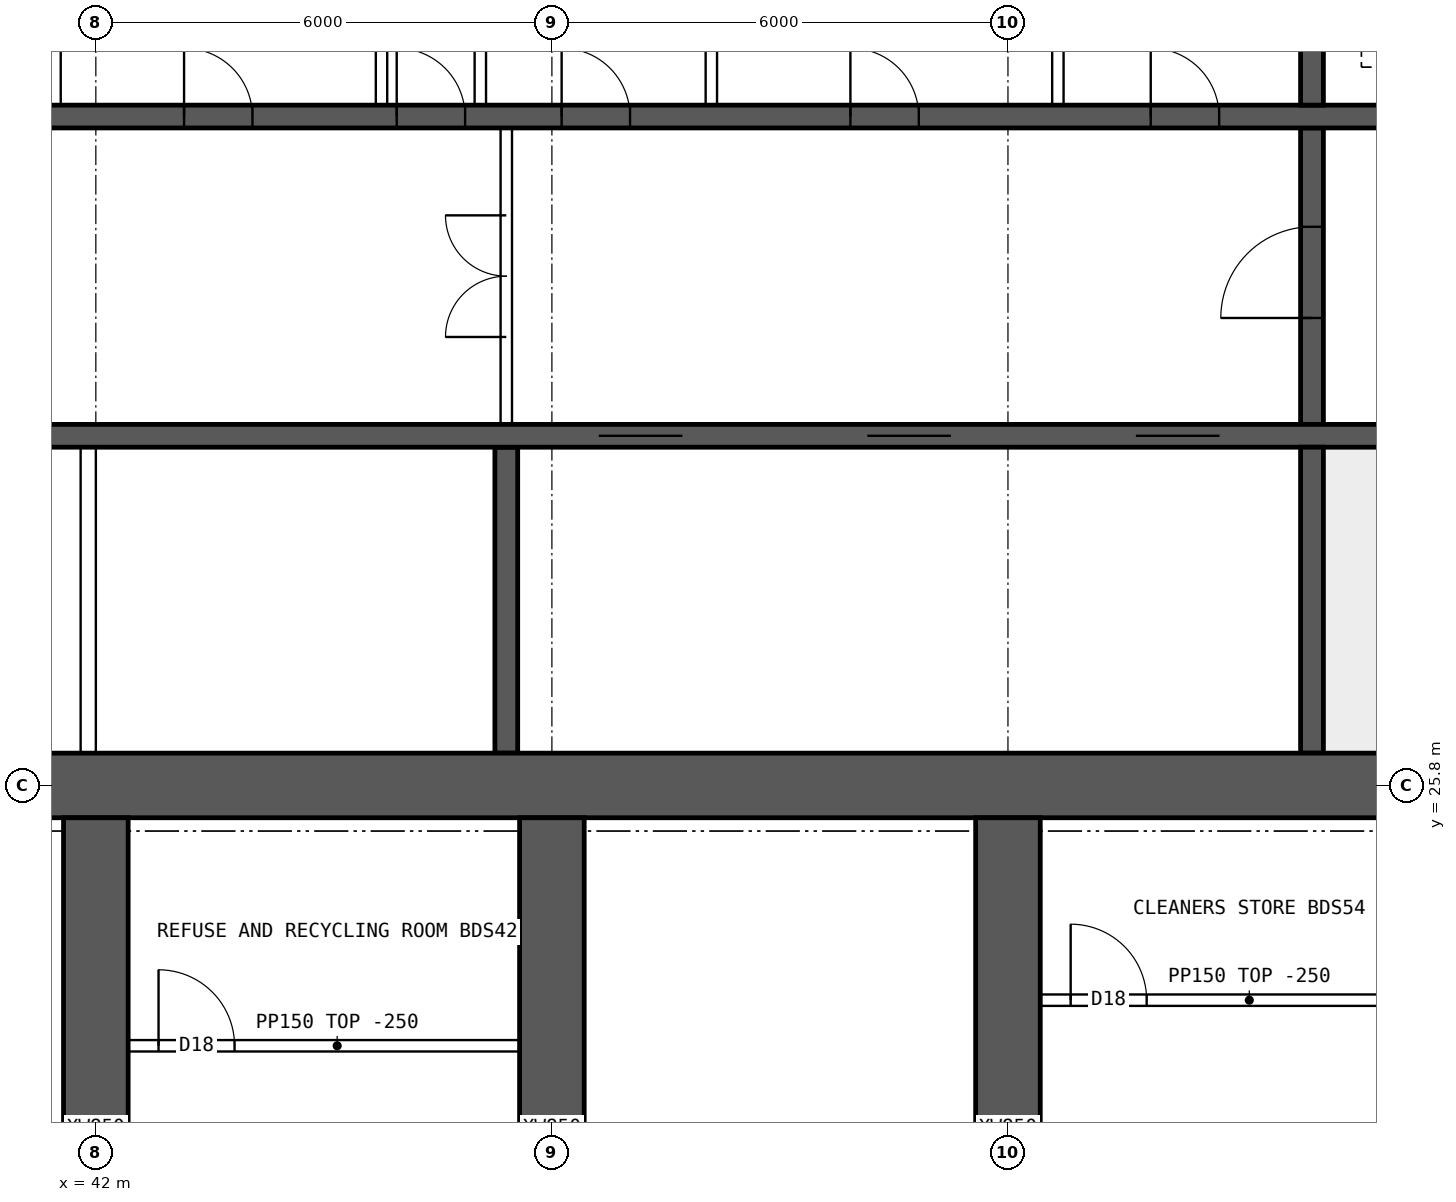
"""IFC4 building model, lengths in metres.
Left out: names, types, materials, properties, quantities, classifications, styles, units other than length and angle.
Written with IfcOpenShell. Run it as: python <this file> out.ifc"""

import sys

from ifc_helpers import new_model, si_unit, direction, frame, frame_2d, origin, place, context, subcontext, project, spatial, rectangle, extrude, element, fill, save


model = new_model("IFC4")
c1 = context("Model", 3, precision=1e-05, world=origin(), true_north=direction((0.0, 1.0)))
c2 = subcontext(c1, "Body", "Model", "MODEL_VIEW")
j1 = project(units=[si_unit("LENGTHUNIT", "METRE"), si_unit("PLANEANGLEUNIT", "RADIAN")], contexts=[c1])
p1 = place(None, origin())
s1 = spatial("IfcSite", under=j1, at=p1, CompositionType="ELEMENT")
p2 = place(p1, origin())
s2 = spatial("IfcBuilding", under=s1, at=p2, CompositionType="ELEMENT")
p3 = place(p2, frame((0.0, 0.0, 152.35)))
s3 = spatial("IfcBuildingStorey", under=s2, at=p3, CompositionType="ELEMENT", Elevation=152.35)
p4 = place(p3, frame((18.0, 25.8, 0.0), z_axis=(0.0, 0.0, 1.0), x_axis=(1.0, 0.0, 0.0)))
e1 = element("IfcWall", 1, at=p4, inside=s3, PredefinedType="SHEAR", context=c2, shape_type="SweptSolid", body=[
    extrude(rectangle(XDim=48.0, YDim=0.85, at=frame_2d((24.0, 0.0))), origin(), (0.0, 0.0, 1.0), 3.75),
])
p5 = place(p3, frame((18.425, 30.4, 0.0), z_axis=(0.0, 0.0, 1.0), x_axis=(1.0, 0.0, 0.0)))
e2 = element("IfcWall", 2, at=p5, inside=s3, PredefinedType="SHEAR", context=c2, shape_type="SweptSolid", body=[
    extrude(rectangle(XDim=47.15, YDim=0.3, at=frame_2d((23.575, 0.0))), origin(), (0.0, 0.0, 1.0), 3.75),
])
p6 = place(p5, frame((0.4, 0.0, 0.0)))
e3 = element("IfcOpeningElement", 3, at=p6, cuts=e2, PredefinedType="OPENING", context=c2, shape_type="SweptSolid", body=[
    extrude(rectangle(XDim=1.0, YDim=2.1, at=frame_2d((0.5, 1.05))), frame((0.0, 0.16, 0.0), z_axis=(0.0, -1.0, 0.0), x_axis=(1.0, 0.0, 0.0)), (0.0, 0.0, 1.0), 0.32),
])
p7 = place(p5, frame((45.75, 0.0, 0.0)))
e4 = element("IfcOpeningElement", 4, at=p7, cuts=e2, PredefinedType="OPENING", context=c2, shape_type="SweptSolid", body=[
    extrude(rectangle(XDim=1.0, YDim=2.1, at=frame_2d((0.5, 1.05))), frame((0.0, 0.16, 0.0), z_axis=(0.0, -1.0, 0.0), x_axis=(1.0, 0.0, 0.0)), (0.0, 0.0, 1.0), 0.32),
])
p8 = place(p5, frame((8.325, 0.0, 0.0)))
e5 = element("IfcOpeningElement", 5, at=p8, cuts=e2, PredefinedType="OPENING", context=c2, shape_type="SweptSolid", body=[
    extrude(rectangle(XDim=1.1, YDim=2.1, at=frame_2d((0.55, 1.05))), frame((0.0, 0.16, 0.0), z_axis=(0.0, -1.0, 0.0), x_axis=(1.0, 0.0, 0.0)), (0.0, 0.0, 1.0), 0.32),
])
p9 = place(p5, frame((10.925, 0.0, 0.0)))
e6 = element("IfcOpeningElement", 6, at=p9, cuts=e2, PredefinedType="OPENING", context=c2, shape_type="SweptSolid", body=[
    extrude(rectangle(XDim=1.1, YDim=2.1, at=frame_2d((0.55, 1.05))), frame((0.0, 0.16, 0.0), z_axis=(0.0, -1.0, 0.0), x_axis=(1.0, 0.0, 0.0)), (0.0, 0.0, 1.0), 0.32),
])
p10 = place(p5, frame((13.525, 0.0, 0.0)))
e7 = element("IfcOpeningElement", 7, at=p10, cuts=e2, PredefinedType="OPENING", context=c2, shape_type="SweptSolid", body=[
    extrude(rectangle(XDim=1.1, YDim=2.1, at=frame_2d((0.55, 1.05))), frame((0.0, 0.16, 0.0), z_axis=(0.0, -1.0, 0.0), x_axis=(1.0, 0.0, 0.0)), (0.0, 0.0, 1.0), 0.32),
])
p11 = place(p5, frame((16.125, 0.0, 0.0)))
e8 = element("IfcOpeningElement", 8, at=p11, cuts=e2, PredefinedType="OPENING", context=c2, shape_type="SweptSolid", body=[
    extrude(rectangle(XDim=1.1, YDim=2.1, at=frame_2d((0.55, 1.05))), frame((0.0, 0.16, 0.0), z_axis=(0.0, -1.0, 0.0), x_axis=(1.0, 0.0, 0.0)), (0.0, 0.0, 1.0), 0.32),
])
p12 = place(p5, frame((18.9, 0.0, 0.0)))
e9 = element("IfcOpeningElement", 9, at=p12, cuts=e2, PredefinedType="OPENING", context=c2, shape_type="SweptSolid", body=[
    extrude(rectangle(XDim=0.9, YDim=2.1, at=frame_2d((0.45, 1.05))), frame((0.0, 0.16, 0.0), z_axis=(0.0, -1.0, 0.0), x_axis=(1.0, 0.0, 0.0)), (0.0, 0.0, 1.0), 0.32),
])
p13 = place(p5, frame((30.192, 0.0, 0.0)))
e10 = element("IfcOpeningElement", 10, at=p13, cuts=e2, PredefinedType="OPENING", context=c2, shape_type="SweptSolid", body=[
    extrude(rectangle(XDim=1.1, YDim=2.1, at=frame_2d((0.55, 1.05))), frame((0.0, 0.16, 0.0), z_axis=(0.0, -1.0, 0.0), x_axis=(1.0, 0.0, 0.0)), (0.0, 0.0, 1.0), 0.32),
])
p14 = place(p5, frame((33.725, 0.0, 0.0)))
e11 = element("IfcOpeningElement", 11, at=p14, cuts=e2, PredefinedType="OPENING", context=c2, shape_type="SweptSolid", body=[
    extrude(rectangle(XDim=1.1, YDim=2.1, at=frame_2d((0.55, 1.05))), frame((0.0, 0.16, 0.0), z_axis=(0.0, -1.0, 0.0), x_axis=(1.0, 0.0, 0.0)), (0.0, 0.0, 1.0), 0.32),
])
p15 = place(p5, frame((37.258, 0.0, 0.0)))
e12 = element("IfcOpeningElement", 12, at=p15, cuts=e2, PredefinedType="OPENING", context=c2, shape_type="SweptSolid", body=[
    extrude(rectangle(XDim=1.1, YDim=2.1, at=frame_2d((0.55, 1.05))), frame((0.0, 0.16, 0.0), z_axis=(0.0, -1.0, 0.0), x_axis=(1.0, 0.0, 0.0)), (0.0, 0.0, 1.0), 0.32),
])
p16 = place(p3, frame((18.425, 34.6, 0.0), z_axis=(0.0, 0.0, 1.0), x_axis=(1.0, 0.0, 0.0)))
e13 = element("IfcWall", 13, at=p16, inside=s3, PredefinedType="SHEAR", context=c2, shape_type="SweptSolid", body=[
    extrude(rectangle(XDim=47.15, YDim=0.3, at=frame_2d((23.575, 0.0))), origin(), (0.0, 0.0, 1.0), 3.75),
])
p17 = place(p16, frame((0.9, 0.0, 0.0)))
e14 = element("IfcOpeningElement", 14, at=p17, cuts=e13, PredefinedType="OPENING", context=c2, shape_type="SweptSolid", body=[
    extrude(rectangle(XDim=1.1, YDim=2.1, at=frame_2d((0.55, 1.05))), frame((0.0, 0.16, 0.0), z_axis=(0.0, -1.0, 0.0), x_axis=(1.0, 0.0, 0.0)), (0.0, 0.0, 1.0), 0.32),
])
p18 = place(p16, frame((45.15, 0.0, 0.0)))
e15 = element("IfcOpeningElement", 15, at=p18, cuts=e13, PredefinedType="OPENING", context=c2, shape_type="SweptSolid", body=[
    extrude(rectangle(XDim=1.1, YDim=2.1, at=frame_2d((0.55, 1.05))), frame((0.0, 0.16, 0.0), z_axis=(0.0, -1.0, 0.0), x_axis=(1.0, 0.0, 0.0)), (0.0, 0.0, 1.0), 0.32),
])
p19 = place(p16, frame((4.175, 0.0, 0.0)))
e16 = element("IfcOpeningElement", 16, at=p19, cuts=e13, PredefinedType="OPENING", context=c2, shape_type="SweptSolid", body=[
    extrude(rectangle(XDim=0.9, YDim=2.1, at=frame_2d((0.45, 1.05))), frame((0.0, 0.16, 0.0), z_axis=(0.0, -1.0, 0.0), x_axis=(1.0, 0.0, 0.0)), (0.0, 0.0, 1.0), 0.32),
])
p20 = place(p16, frame((42.075, 0.0, 0.0)))
e17 = element("IfcOpeningElement", 17, at=p20, cuts=e13, PredefinedType="OPENING", context=c2, shape_type="SweptSolid", body=[
    extrude(rectangle(XDim=0.9, YDim=2.1, at=frame_2d((0.45, 1.05))), frame((0.0, 0.16, 0.0), z_axis=(0.0, -1.0, 0.0), x_axis=(1.0, 0.0, 0.0)), (0.0, 0.0, 1.0), 0.32),
])
p21 = place(p16, frame((8.95, 0.0, 0.0)))
e18 = element("IfcOpeningElement", 18, at=p21, cuts=e13, PredefinedType="OPENING", context=c2, shape_type="SweptSolid", body=[
    extrude(rectangle(XDim=0.9, YDim=2.1, at=frame_2d((0.45, 1.05))), frame((0.0, 0.16, 0.0), z_axis=(0.0, -1.0, 0.0), x_axis=(1.0, 0.0, 0.0)), (0.0, 0.0, 1.0), 0.32),
])
p22 = place(p16, frame((12.924, 0.0, 0.0)))
e19 = element("IfcOpeningElement", 19, at=p22, cuts=e13, PredefinedType="OPENING", context=c2, shape_type="SweptSolid", body=[
    extrude(rectangle(XDim=0.9, YDim=2.1, at=frame_2d((0.45, 1.05))), frame((0.0, 0.16, 0.0), z_axis=(0.0, -1.0, 0.0), x_axis=(1.0, 0.0, 0.0)), (0.0, 0.0, 1.0), 0.32),
])
p23 = place(p16, frame((16.571, 0.0, 0.0)))
e20 = element("IfcOpeningElement", 20, at=p23, cuts=e13, PredefinedType="OPENING", context=c2, shape_type="SweptSolid", body=[
    extrude(rectangle(XDim=0.9, YDim=2.1, at=frame_2d((0.45, 1.05))), frame((0.0, 0.16, 0.0), z_axis=(0.0, -1.0, 0.0), x_axis=(1.0, 0.0, 0.0)), (0.0, 0.0, 1.0), 0.32),
])
p24 = place(p16, frame((20.33, 0.0, 0.0)))
e21 = element("IfcOpeningElement", 21, at=p24, cuts=e13, PredefinedType="OPENING", context=c2, shape_type="SweptSolid", body=[
    extrude(rectangle(XDim=0.9, YDim=2.1, at=frame_2d((0.45, 1.05))), frame((0.0, 0.16, 0.0), z_axis=(0.0, -1.0, 0.0), x_axis=(1.0, 0.0, 0.0)), (0.0, 0.0, 1.0), 0.32),
])
p25 = place(p16, frame((24.736, 0.0, 0.0)))
e22 = element("IfcOpeningElement", 22, at=p25, cuts=e13, PredefinedType="OPENING", context=c2, shape_type="SweptSolid", body=[
    extrude(rectangle(XDim=0.9, YDim=2.1, at=frame_2d((0.45, 1.05))), frame((0.0, 0.16, 0.0), z_axis=(0.0, -1.0, 0.0), x_axis=(1.0, 0.0, 0.0)), (0.0, 0.0, 1.0), 0.32),
])
p26 = place(p16, frame((27.533, 0.0, 0.0)))
e23 = element("IfcOpeningElement", 23, at=p26, cuts=e13, PredefinedType="OPENING", context=c2, shape_type="SweptSolid", body=[
    extrude(rectangle(XDim=0.9, YDim=2.1, at=frame_2d((0.45, 1.05))), frame((0.0, 0.16, 0.0), z_axis=(0.0, -1.0, 0.0), x_axis=(1.0, 0.0, 0.0)), (0.0, 0.0, 1.0), 0.32),
])
p27 = place(p16, frame((29.703, 0.0, 0.0)))
e24 = element("IfcOpeningElement", 24, at=p27, cuts=e13, PredefinedType="OPENING", context=c2, shape_type="SweptSolid", body=[
    extrude(rectangle(XDim=0.9, YDim=2.1, at=frame_2d((0.45, 1.05))), frame((0.0, 0.16, 0.0), z_axis=(0.0, -1.0, 0.0), x_axis=(1.0, 0.0, 0.0)), (0.0, 0.0, 1.0), 0.32),
])
p28 = place(p16, frame((33.502, 0.0, 0.0)))
e25 = element("IfcOpeningElement", 25, at=p28, cuts=e13, PredefinedType="OPENING", context=c2, shape_type="SweptSolid", body=[
    extrude(rectangle(XDim=0.9, YDim=2.1, at=frame_2d((0.45, 1.05))), frame((0.0, 0.16, 0.0), z_axis=(0.0, -1.0, 0.0), x_axis=(1.0, 0.0, 0.0)), (0.0, 0.0, 1.0), 0.32),
])
p29 = place(p16, frame((37.453, 0.0, 0.0)))
e26 = element("IfcOpeningElement", 26, at=p29, cuts=e13, PredefinedType="OPENING", context=c2, shape_type="SweptSolid", body=[
    extrude(rectangle(XDim=0.9, YDim=2.1, at=frame_2d((0.45, 1.05))), frame((0.0, 0.16, 0.0), z_axis=(0.0, -1.0, 0.0), x_axis=(1.0, 0.0, 0.0)), (0.0, 0.0, 1.0), 0.32),
])
p30 = place(p3, frame((58.0, 26.225, 0.0), z_axis=(0.0, 0.0, 1.0), x_axis=(0.0, 1.0, 0.0)))
e27 = element("IfcWall", 27, at=p30, inside=s3, PredefinedType="SHEAR", context=c2, shape_type="SweptSolid", body=[
    extrude(rectangle(XDim=4.025, YDim=0.3, at=frame_2d((2.012, 0.0))), origin(), (0.0, 0.0, 1.0), 3.75),
])
p31 = place(p3, frame((58.0, 30.55, 0.0), z_axis=(0.0, 0.0, 1.0), x_axis=(0.0, 1.0, 0.0)))
e28 = element("IfcWall", 28, at=p31, inside=s3, PredefinedType="SHEAR", context=c2, shape_type="SweptSolid", body=[
    extrude(rectangle(XDim=3.9, YDim=0.3, at=frame_2d((1.95, 0.0))), origin(), (0.0, 0.0, 1.0), 3.75),
])
p32 = place(p31, frame((1.4, 0.0, 0.0)))
e29 = element("IfcOpeningElement", 29, at=p32, cuts=e28, PredefinedType="OPENING", context=c2, shape_type="SweptSolid", body=[
    extrude(rectangle(XDim=1.2, YDim=2.1, at=frame_2d((0.6, 1.05))), frame((0.0, 0.16, 0.0), z_axis=(0.0, -1.0, 0.0), x_axis=(1.0, 0.0, 0.0)), (0.0, 0.0, 1.0), 0.32),
])
p33 = place(p3, frame((58.0, 34.75, 0.0), z_axis=(0.0, 0.0, 1.0), x_axis=(0.0, 1.0, 0.0)))
e30 = element("IfcWall", 30, at=p33, inside=s3, PredefinedType="SHEAR", context=c2, shape_type="SweptSolid", body=[
    extrude(rectangle(XDim=3.025, YDim=0.3, at=frame_2d((1.512, 0.0))), origin(), (0.0, 0.0, 1.0), 3.75),
])
p34 = place(p3, frame((47.4, 26.225, 0.0), z_axis=(0.0, 0.0, 1.0), x_axis=(0.0, 1.0, 0.0)))
e31 = element("IfcWall", 31, at=p34, inside=s3, PredefinedType="SHEAR", context=c2, shape_type="SweptSolid", body=[
    extrude(rectangle(XDim=4.025, YDim=0.3, at=frame_2d((2.012, 0.0))), origin(), (0.0, 0.0, 1.0), 3.75),
])
for number, where, z_axis, x_axis in (
    (32, (42.0, 17.2, 0.0), (0.0, 0.0, 1.0), (0.0, 1.0, 0.0)),
    (33, (48.0, 17.2, 0.0), (0.0, 0.0, 1.0), (0.0, 1.0, 0.0)),
    (34, (54.0, 17.2, 0.0), (0.0, 0.0, 1.0), (0.0, 1.0, 0.0)),
):
    element("IfcWall", number, at=place(p3, frame(where, z_axis=z_axis, x_axis=x_axis)), inside=s3, PredefinedType="SHEAR", context=c2, shape_type="SweptSolid", body=[
        extrude(rectangle(XDim=8.175, YDim=0.85, at=frame_2d((4.087, 0.0))), origin(), (0.0, 0.0, 1.0), 3.75),
    ])
p35 = place(p3, frame((47.4, 30.55, 0.0), z_axis=(0.0, 0.0, 1.0), x_axis=(0.0, 1.0, 0.0)))
e35 = element("IfcWall", 35, at=p35, inside=s3, PredefinedType="SOLIDWALL", context=c2, shape_type="SweptSolid", body=[
    extrude(rectangle(XDim=3.9, YDim=0.15, at=frame_2d((1.95, 0.0))), origin(), (0.0, 0.0, 1.0), 3.5),
])
p36 = place(p35, frame((1.15, 0.0, 0.0)))
e36 = element("IfcOpeningElement", 36, at=p36, cuts=e35, PredefinedType="OPENING", context=c2, shape_type="SweptSolid", body=[
    extrude(rectangle(XDim=1.6, YDim=2.1, at=frame_2d((0.8, 1.05))), frame((0.0, 0.085, 0.0), z_axis=(0.0, -1.0, 0.0), x_axis=(1.0, 0.0, 0.0)), (0.0, 0.0, 1.0), 0.17),
])
for number, where, z_axis, x_axis in (
    (37, (41.463, 34.75, 0.0), (0.0, 0.0, 1.0), (0.0, 1.0, 0.0)),
    (38, (45.758, 34.75, 0.0), (0.0, 0.0, 1.0), (0.0, 1.0, 0.0)),
    (39, (47.058, 34.75, 0.0), (0.0, 0.0, 1.0), (0.0, 1.0, 0.0)),
    (40, (50.098, 34.75, 0.0), (0.0, 0.0, 1.0), (0.0, 1.0, 0.0)),
    (41, (54.657, 34.75, 0.0), (0.0, 0.0, 1.0), (0.0, 1.0, 0.0)),
):
    element("IfcWall", number, at=place(p3, frame(where, z_axis=z_axis, x_axis=x_axis)), inside=s3, PredefinedType="SOLIDWALL", context=c2, shape_type="SweptSolid", body=[
        extrude(rectangle(XDim=3.025, YDim=0.15, at=frame_2d((1.512, 0.0))), origin(), (0.0, 0.0, 1.0), 3.5),
    ])
p37 = place(p3, frame((41.9, 26.225, 0.0), z_axis=(0.0, 0.0, 1.0), x_axis=(0.0, 1.0, 0.0)))
e42 = element("IfcWall", 42, at=p37, inside=s3, PredefinedType="SOLIDWALL", context=c2, shape_type="SweptSolid", body=[
    extrude(rectangle(XDim=4.025, YDim=0.2, at=frame_2d((2.012, 0.0))), origin(), (0.0, 0.0, 1.0), 3.5),
])
p38 = place(p3, frame((42.425, 22.375, 0.0), z_axis=(0.0, 0.0, 1.0), x_axis=(1.0, 0.0, 0.0)))
e43 = element("IfcWall", 43, at=p38, inside=s3, PredefinedType="PARTITIONING", context=c2, shape_type="SweptSolid", body=[
    extrude(rectangle(XDim=5.5, YDim=0.15, at=frame_2d((2.75, 0.0))), origin(), (0.0, 0.0, 1.0), 3.5),
])
p39 = place(p38, frame((0.4, 0.0, 0.0)))
e44 = element("IfcOpeningElement", 44, at=p39, cuts=e43, PredefinedType="OPENING", context=c2, shape_type="SweptSolid", body=[
    extrude(rectangle(XDim=1.0, YDim=2.1, at=frame_2d((0.5, 1.05))), frame((0.0, 0.085, 0.0), z_axis=(0.0, -1.0, 0.0), x_axis=(1.0, 0.0, 0.0)), (0.0, 0.0, 1.0), 0.17),
])
p40 = place(p3, frame((54.425, 22.975, 0.0), z_axis=(0.0, 0.0, 1.0), x_axis=(1.0, 0.0, 0.0)))
e45 = element("IfcWall", 45, at=p40, inside=s3, PredefinedType="PARTITIONING", context=c2, shape_type="SweptSolid", body=[
    extrude(rectangle(XDim=5.5, YDim=0.15, at=frame_2d((2.75, 0.0))), origin(), (0.0, 0.0, 1.0), 3.5),
])
p41 = place(p40, frame((0.4, 0.0, 0.0)))
e46 = element("IfcOpeningElement", 46, at=p41, cuts=e45, PredefinedType="OPENING", context=c2, shape_type="SweptSolid", body=[
    extrude(rectangle(XDim=1.0, YDim=2.1, at=frame_2d((0.5, 1.05))), frame((0.0, 0.085, 0.0), z_axis=(0.0, -1.0, 0.0), x_axis=(1.0, 0.0, 0.0)), (0.0, 0.0, 1.0), 0.17),
])
p42 = place(p36, origin())
e47 = element("IfcDoor", 47, at=p42, inside=s3, OperationType="DOUBLE_DOOR_SINGLE_SWING", PredefinedType="DOOR", context=c2, shape_type="SweptSolid", body=[
    extrude(rectangle(XDim=1.6, YDim=2.1, at=frame_2d((0.8, 1.05))), frame((0.0, 0.025, 0.0), z_axis=(0.0, -1.0, 0.0), x_axis=(1.0, 0.0, 0.0)), (0.0, 0.0, 1.0), 0.05),
])
fill(e36, e47)
p43 = place(p32, origin())
e48 = element("IfcDoor", 48, at=p43, inside=s3, OperationType="SINGLE_SWING_LEFT", PredefinedType="DOOR", context=c2, shape_type="SweptSolid", body=[
    extrude(rectangle(XDim=1.2, YDim=2.1, at=frame_2d((0.6, 1.05))), frame((0.0, 0.025, 0.0), z_axis=(0.0, -1.0, 0.0), x_axis=(1.0, 0.0, 0.0)), (0.0, 0.0, 1.0), 0.05),
])
fill(e29, e48)
p44 = place(p25, origin())
e49 = element("IfcDoor", 49, at=p44, inside=s3, OperationType="SINGLE_SWING_LEFT", PredefinedType="DOOR", context=c2, shape_type="SweptSolid", body=[
    extrude(rectangle(XDim=0.9, YDim=2.1, at=frame_2d((0.45, 1.05))), frame((0.0, 0.025, 0.0), z_axis=(0.0, -1.0, 0.0), x_axis=(1.0, 0.0, 0.0)), (0.0, 0.0, 1.0), 0.05),
])
fill(e22, e49)
p45 = place(p26, origin())
e50 = element("IfcDoor", 50, at=p45, inside=s3, OperationType="SINGLE_SWING_LEFT", PredefinedType="DOOR", context=c2, shape_type="SweptSolid", body=[
    extrude(rectangle(XDim=0.9, YDim=2.1, at=frame_2d((0.45, 1.05))), frame((0.0, 0.025, 0.0), z_axis=(0.0, -1.0, 0.0), x_axis=(1.0, 0.0, 0.0)), (0.0, 0.0, 1.0), 0.05),
])
fill(e23, e50)
p46 = place(p27, origin())
e51 = element("IfcDoor", 51, at=p46, inside=s3, OperationType="SINGLE_SWING_LEFT", PredefinedType="DOOR", context=c2, shape_type="SweptSolid", body=[
    extrude(rectangle(XDim=0.9, YDim=2.1, at=frame_2d((0.45, 1.05))), frame((0.0, 0.025, 0.0), z_axis=(0.0, -1.0, 0.0), x_axis=(1.0, 0.0, 0.0)), (0.0, 0.0, 1.0), 0.05),
])
fill(e24, e51)
p47 = place(p28, origin())
e52 = element("IfcDoor", 52, at=p47, inside=s3, OperationType="SINGLE_SWING_LEFT", PredefinedType="DOOR", context=c2, shape_type="SweptSolid", body=[
    extrude(rectangle(XDim=0.9, YDim=2.1, at=frame_2d((0.45, 1.05))), frame((0.0, 0.025, 0.0), z_axis=(0.0, -1.0, 0.0), x_axis=(1.0, 0.0, 0.0)), (0.0, 0.0, 1.0), 0.05),
])
fill(e25, e52)
p48 = place(p29, origin())
e53 = element("IfcDoor", 53, at=p48, inside=s3, OperationType="SINGLE_SWING_LEFT", PredefinedType="DOOR", context=c2, shape_type="SweptSolid", body=[
    extrude(rectangle(XDim=0.9, YDim=2.1, at=frame_2d((0.45, 1.05))), frame((0.0, 0.025, 0.0), z_axis=(0.0, -1.0, 0.0), x_axis=(1.0, 0.0, 0.0)), (0.0, 0.0, 1.0), 0.05),
])
fill(e26, e53)
p49 = place(p13, origin())
e54 = element("IfcDoor", 54, at=p49, inside=s3, OperationType="DOUBLE_DOOR_SLIDING", PredefinedType="DOOR", context=c2, shape_type="SweptSolid", body=[
    extrude(rectangle(XDim=1.1, YDim=2.1, at=frame_2d((0.55, 1.05))), frame((0.0, 0.025, 0.0), z_axis=(0.0, -1.0, 0.0), x_axis=(1.0, 0.0, 0.0)), (0.0, 0.0, 1.0), 0.05),
])
fill(e10, e54)
p50 = place(p14, origin())
e55 = element("IfcDoor", 55, at=p50, inside=s3, OperationType="DOUBLE_DOOR_SLIDING", PredefinedType="DOOR", context=c2, shape_type="SweptSolid", body=[
    extrude(rectangle(XDim=1.1, YDim=2.1, at=frame_2d((0.55, 1.05))), frame((0.0, 0.025, 0.0), z_axis=(0.0, -1.0, 0.0), x_axis=(1.0, 0.0, 0.0)), (0.0, 0.0, 1.0), 0.05),
])
fill(e11, e55)
p51 = place(p15, origin())
e56 = element("IfcDoor", 56, at=p51, inside=s3, OperationType="DOUBLE_DOOR_SLIDING", PredefinedType="DOOR", context=c2, shape_type="SweptSolid", body=[
    extrude(rectangle(XDim=1.1, YDim=2.1, at=frame_2d((0.55, 1.05))), frame((0.0, 0.025, 0.0), z_axis=(0.0, -1.0, 0.0), x_axis=(1.0, 0.0, 0.0)), (0.0, 0.0, 1.0), 0.05),
])
fill(e12, e56)
p52 = place(p39, origin())
e57 = element("IfcDoor", 57, at=p52, inside=s3, OperationType="SINGLE_SWING_LEFT", PredefinedType="DOOR", context=c2, shape_type="SweptSolid", body=[
    extrude(rectangle(XDim=1.0, YDim=2.1, at=frame_2d((0.5, 1.05))), frame((0.0, 0.025, 0.0), z_axis=(0.0, -1.0, 0.0), x_axis=(1.0, 0.0, 0.0)), (0.0, 0.0, 1.0), 0.05),
])
fill(e44, e57)
p53 = place(p41, origin())
e58 = element("IfcDoor", 58, at=p53, inside=s3, OperationType="SINGLE_SWING_LEFT", PredefinedType="DOOR", context=c2, shape_type="SweptSolid", body=[
    extrude(rectangle(XDim=1.0, YDim=2.1, at=frame_2d((0.5, 1.05))), frame((0.0, 0.025, 0.0), z_axis=(0.0, -1.0, 0.0), x_axis=(1.0, 0.0, 0.0)), (0.0, 0.0, 1.0), 0.05),
])
fill(e46, e58)
save(model, sys.argv[1])
